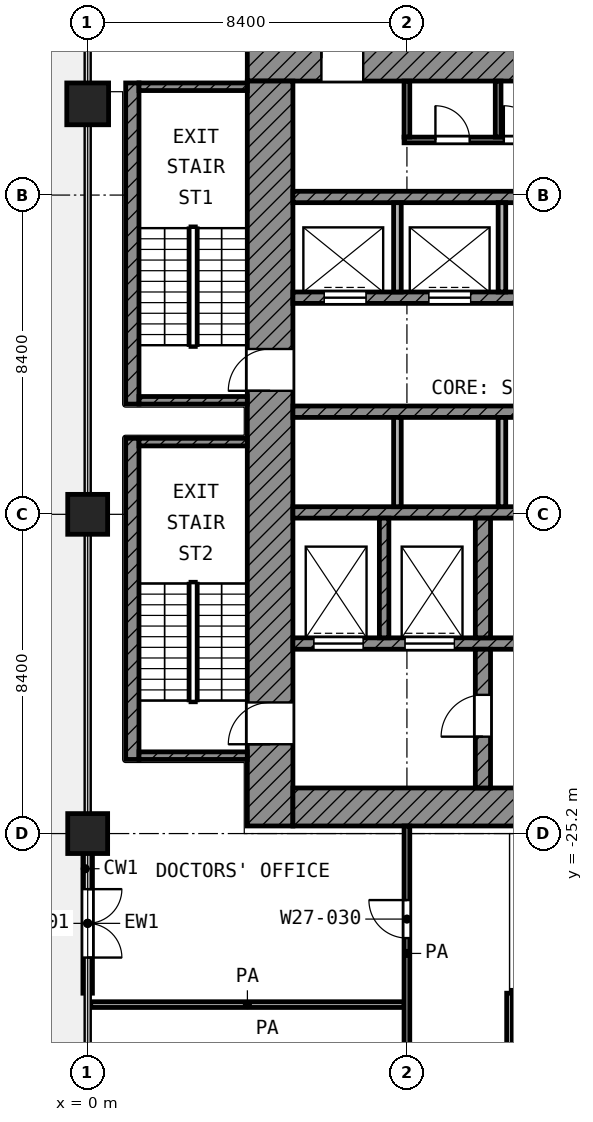
"""IFC4 building model, lengths in metres.
Left out: names, types, materials, properties, quantities, classifications, styles, units other than length and angle.
Written with IfcOpenShell. Run it as: python <this file> out.ifc"""

import sys

from ifc_helpers import new_model, si_unit, direction, frame, frame_2d, origin, origin_2d, place, context, subcontext, project, spatial, rectangle, extrude, element, fill, save


model = new_model("IFC4")
c1 = context("Model", 3, precision=1e-05, world=origin(), true_north=direction((0.0, 1.0)))
c2 = subcontext(c1, "Body", "Model", "MODEL_VIEW")
j1 = project(units=[si_unit("LENGTHUNIT", "METRE"), si_unit("PLANEANGLEUNIT", "RADIAN")], contexts=[c1])
p1 = place(None, origin())
s1 = spatial("IfcSite", under=j1, at=p1, CompositionType="ELEMENT")
p2 = place(p1, origin())
s2 = spatial("IfcBuilding", under=s1, at=p2, CompositionType="ELEMENT")
p3 = place(p2, frame((0.0, 0.0, 119.8)))
s3 = spatial("IfcBuildingStorey", under=s2, at=p3, CompositionType="ELEMENT", Elevation=119.8)
p4 = place(p3, frame((0.0, -6.0, 0.0), z_axis=(0.0, 0.0, 1.0), x_axis=(1.0, 0.0, 0.0)))
e1 = element("IfcColumn", 1, at=p4, inside=s3, PredefinedType="COLUMN", context=c2, shape_type="SweptSolid", body=[
    extrude(rectangle(XDim=1.1, YDim=1.1, at=origin_2d()), origin(), (0.0, 0.0, 1.0), 4.2),
])
for number, where, z_axis, x_axis in (
    (2, (0.0, -16.8, 0.0), (0.0, 0.0, 1.0), (1.0, 0.0, 0.0)),
    (3, (0.0, -25.2, 0.0), (0.0, 0.0, 1.0), (1.0, 0.0, 0.0)),
):
    element("IfcColumn", number, at=place(p3, frame(where, z_axis=z_axis, x_axis=x_axis)), inside=s3, PredefinedType="COLUMN", context=c2, shape_type="SweptSolid", body=[
        extrude(rectangle(XDim=1.05, YDim=1.05, at=origin_2d()), origin(), (0.0, 0.0, 1.0), 4.2),
    ])
p5 = place(p3, frame((0.0, -25.725, 0.0), z_axis=(0.0, 0.0, 1.0), x_axis=(0.0, -1.0, 0.0)))
e4 = element("IfcWall", 4, at=p5, inside=s3, PredefinedType="SOLIDWALL", context=c2, shape_type="SweptSolid", body=[
    extrude(rectangle(XDim=3.675, YDim=0.25, at=frame_2d((1.837, 0.0))), origin(), (0.0, 0.0, 1.0), 3.48),
])
p6 = place(p5, frame((0.938, 0.0, 0.0)))
e5 = element("IfcOpeningElement", 5, at=p6, cuts=e4, PredefinedType="OPENING", context=c2, shape_type="SweptSolid", body=[
    extrude(rectangle(XDim=1.8, YDim=2.1, at=frame_2d((0.9, 1.05))), frame((0.0, 0.135, 0.0), z_axis=(0.0, -1.0, 0.0), x_axis=(1.0, 0.0, 0.0)), (0.0, 0.0, 1.0), 0.27),
])
p7 = place(p3, frame((4.2, -4.8, 0.0), z_axis=(0.0, 0.0, 1.0), x_axis=(1.0, 0.0, 0.0)))
e6 = element("IfcWall", 6, at=p7, inside=s3, PredefinedType="SHEAR", context=c2, shape_type="SweptSolid", body=[
    extrude(rectangle(XDim=20.8, YDim=1.2, at=frame_2d((10.4, 0.0))), origin(), (0.0, 0.0, 1.0), 3.6),
])
p8 = place(p7, frame((1.95, 0.0, 0.0)))
e7 = element("IfcOpeningElement", 7, at=p8, cuts=e6, PredefinedType="OPENING", context=c2, shape_type="SweptSolid", body=[
    extrude(rectangle(XDim=1.1, YDim=2.1, at=frame_2d((0.55, 1.05))), frame((0.0, 0.61, 0.0), z_axis=(0.0, -1.0, 0.0), x_axis=(1.0, 0.0, 0.0)), (0.0, 0.0, 1.0), 1.22),
])
p9 = place(p7, frame((17.95, 0.0, 0.0)))
e8 = element("IfcOpeningElement", 8, at=p9, cuts=e6, PredefinedType="OPENING", context=c2, shape_type="SweptSolid", body=[
    extrude(rectangle(XDim=1.1, YDim=2.1, at=frame_2d((0.55, 1.05))), frame((0.0, 0.61, 0.0), z_axis=(0.0, -1.0, 0.0), x_axis=(1.0, 0.0, 0.0)), (0.0, 0.0, 1.0), 1.22),
])
p10 = place(p3, frame((4.8, -25.0, 0.0), z_axis=(0.0, 0.0, 1.0), x_axis=(0.0, 1.0, 0.0)))
e9 = element("IfcWall", 9, at=p10, inside=s3, PredefinedType="SHEAR", context=c2, shape_type="SweptSolid", body=[
    extrude(rectangle(XDim=19.6, YDim=1.2, at=frame_2d((9.8, 0.0))), origin(), (0.0, 0.0, 1.0), 3.6),
])
p11 = place(p10, frame((11.45, 0.0, 0.0)))
e10 = element("IfcOpeningElement", 10, at=p11, cuts=e9, PredefinedType="OPENING", context=c2, shape_type="SweptSolid", body=[
    extrude(rectangle(XDim=1.1, YDim=2.1, at=frame_2d((0.55, 1.05))), frame((0.0, 0.61, 0.0), z_axis=(0.0, -1.0, 0.0), x_axis=(1.0, 0.0, 0.0)), (0.0, 0.0, 1.0), 1.22),
])
p12 = place(p10, frame((2.15, 0.0, 0.0)))
e11 = element("IfcOpeningElement", 11, at=p12, cuts=e9, PredefinedType="OPENING", context=c2, shape_type="SweptSolid", body=[
    extrude(rectangle(XDim=1.1, YDim=2.1, at=frame_2d((0.55, 1.05))), frame((0.0, 0.61, 0.0), z_axis=(0.0, -1.0, 0.0), x_axis=(1.0, 0.0, 0.0)), (0.0, 0.0, 1.0), 1.22),
])
p13 = place(p3, frame((5.4, -24.5, 0.0), z_axis=(0.0, 0.0, 1.0), x_axis=(1.0, 0.0, 0.0)))
e12 = element("IfcWall", 12, at=p13, inside=s3, PredefinedType="SHEAR", context=c2, shape_type="SweptSolid", body=[
    extrude(rectangle(XDim=18.6, YDim=1.0, at=frame_2d((9.3, 0.0))), origin(), (0.0, 0.0, 1.0), 3.6),
])
p14 = place(p13, frame((6.3, 0.0, 0.0)))
e13 = element("IfcOpeningElement", 13, at=p14, cuts=e12, PredefinedType="OPENING", context=c2, shape_type="SweptSolid", body=[
    extrude(rectangle(XDim=1.8, YDim=2.1, at=frame_2d((0.9, 1.05))), frame((0.0, 0.51, 0.0), z_axis=(0.0, -1.0, 0.0), x_axis=(1.0, 0.0, 0.0)), (0.0, 0.0, 1.0), 1.02),
])
p15 = place(p3, frame((5.4, -8.45, 0.0), z_axis=(0.0, 0.0, 1.0), x_axis=(1.0, 0.0, 0.0)))
e14 = element("IfcWall", 14, at=p15, inside=s3, PredefinedType="SHEAR", context=c2, shape_type="SweptSolid", body=[
    extrude(rectangle(XDim=16.65, YDim=0.3, at=frame_2d((8.325, 0.0))), origin(), (0.0, 0.0, 1.0), 3.6),
])
p16 = place(p3, frame((5.4, -11.1, 0.0), z_axis=(0.0, 0.0, 1.0), x_axis=(1.0, 0.0, 0.0)))
e15 = element("IfcWall", 15, at=p16, inside=s3, PredefinedType="SHEAR", context=c2, shape_type="SweptSolid", body=[
    extrude(rectangle(XDim=16.65, YDim=0.3, at=frame_2d((8.325, 0.0))), origin(), (0.0, 0.0, 1.0), 3.6),
])
p17 = place(p16, frame((0.825, 0.0, 0.0)))
e16 = element("IfcOpeningElement", 16, at=p17, cuts=e15, PredefinedType="OPENING", context=c2, shape_type="SweptSolid", body=[
    extrude(rectangle(XDim=1.1, YDim=2.1, at=frame_2d((0.55, 1.05))), frame((0.0, 0.16, 0.0), z_axis=(0.0, -1.0, 0.0), x_axis=(1.0, 0.0, 0.0)), (0.0, 0.0, 1.0), 0.32),
])
p18 = place(p16, frame((3.575, 0.0, 0.0)))
e17 = element("IfcOpeningElement", 17, at=p18, cuts=e15, PredefinedType="OPENING", context=c2, shape_type="SweptSolid", body=[
    extrude(rectangle(XDim=1.1, YDim=2.1, at=frame_2d((0.55, 1.05))), frame((0.0, 0.16, 0.0), z_axis=(0.0, -1.0, 0.0), x_axis=(1.0, 0.0, 0.0)), (0.0, 0.0, 1.0), 0.32),
])
p19 = place(p16, frame((6.325, 0.0, 0.0)))
e18 = element("IfcOpeningElement", 18, at=p19, cuts=e15, PredefinedType="OPENING", context=c2, shape_type="SweptSolid", body=[
    extrude(rectangle(XDim=1.1, YDim=2.1, at=frame_2d((0.55, 1.05))), frame((0.0, 0.16, 0.0), z_axis=(0.0, -1.0, 0.0), x_axis=(1.0, 0.0, 0.0)), (0.0, 0.0, 1.0), 0.32),
])
p20 = place(p16, frame((9.075, 0.0, 0.0)))
e19 = element("IfcOpeningElement", 19, at=p20, cuts=e15, PredefinedType="OPENING", context=c2, shape_type="SweptSolid", body=[
    extrude(rectangle(XDim=1.1, YDim=2.1, at=frame_2d((0.55, 1.05))), frame((0.0, 0.16, 0.0), z_axis=(0.0, -1.0, 0.0), x_axis=(1.0, 0.0, 0.0)), (0.0, 0.0, 1.0), 0.32),
])
for number, where, z_axis, x_axis in (
    (20, (5.4, -14.1, 0.0), (0.0, 0.0, 1.0), (1.0, 0.0, 0.0)),
    (21, (5.4, -16.75, 0.0), (0.0, 0.0, 1.0), (1.0, 0.0, 0.0)),
):
    element("IfcWall", number, at=place(p3, frame(where, z_axis=z_axis, x_axis=x_axis)), inside=s3, PredefinedType="SHEAR", context=c2, shape_type="SweptSolid", body=[
        extrude(rectangle(XDim=16.65, YDim=0.3, at=frame_2d((8.325, 0.0))), origin(), (0.0, 0.0, 1.0), 3.6),
    ])
p21 = place(p3, frame((5.4, -20.2, 0.0), z_axis=(0.0, 0.0, 1.0), x_axis=(1.0, 0.0, 0.0)))
e22 = element("IfcWall", 22, at=p21, inside=s3, PredefinedType="SHEAR", context=c2, shape_type="SweptSolid", body=[
    extrude(rectangle(XDim=14.65, YDim=0.3, at=frame_2d((7.325, 0.0))), origin(), (0.0, 0.0, 1.0), 3.6),
])
p22 = place(p21, frame((10.55, 0.0, 0.0)))
e23 = element("IfcOpeningElement", 23, at=p22, cuts=e22, PredefinedType="OPENING", context=c2, shape_type="SweptSolid", body=[
    extrude(rectangle(XDim=1.3, YDim=2.1, at=frame_2d((0.65, 1.05))), frame((0.0, 0.16, 0.0), z_axis=(0.0, -1.0, 0.0), x_axis=(1.0, 0.0, 0.0)), (0.0, 0.0, 1.0), 0.32),
])
p23 = place(p21, frame((12.95, 0.0, 0.0)))
e24 = element("IfcOpeningElement", 24, at=p23, cuts=e22, PredefinedType="OPENING", context=c2, shape_type="SweptSolid", body=[
    extrude(rectangle(XDim=1.3, YDim=2.1, at=frame_2d((0.65, 1.05))), frame((0.0, 0.16, 0.0), z_axis=(0.0, -1.0, 0.0), x_axis=(1.0, 0.0, 0.0)), (0.0, 0.0, 1.0), 0.32),
])
p24 = place(p21, frame((0.55, 0.0, 0.0)))
e25 = element("IfcOpeningElement", 25, at=p24, cuts=e22, PredefinedType="OPENING", context=c2, shape_type="SweptSolid", body=[
    extrude(rectangle(XDim=1.3, YDim=2.1, at=frame_2d((0.65, 1.05))), frame((0.0, 0.16, 0.0), z_axis=(0.0, -1.0, 0.0), x_axis=(1.0, 0.0, 0.0)), (0.0, 0.0, 1.0), 0.32),
])
p25 = place(p21, frame((2.95, 0.0, 0.0)))
e26 = element("IfcOpeningElement", 26, at=p25, cuts=e22, PredefinedType="OPENING", context=c2, shape_type="SweptSolid", body=[
    extrude(rectangle(XDim=1.3, YDim=2.1, at=frame_2d((0.65, 1.05))), frame((0.0, 0.16, 0.0), z_axis=(0.0, -1.0, 0.0), x_axis=(1.0, 0.0, 0.0)), (0.0, 0.0, 1.0), 0.32),
])
p26 = place(p21, frame((7.15, 0.0, 0.0)))
e27 = element("IfcOpeningElement", 27, at=p26, cuts=e22, PredefinedType="OPENING", context=c2, shape_type="SweptSolid", body=[
    extrude(rectangle(XDim=0.9, YDim=2.1, at=frame_2d((0.45, 1.05))), frame((0.0, 0.16, 0.0), z_axis=(0.0, -1.0, 0.0), x_axis=(1.0, 0.0, 0.0)), (0.0, 0.0, 1.0), 0.32),
])
p27 = place(p3, frame((10.4, -24.0, 0.0), z_axis=(0.0, 0.0, 1.0), x_axis=(0.0, 1.0, 0.0)))
e28 = element("IfcWall", 28, at=p27, inside=s3, PredefinedType="SHEAR", context=c2, shape_type="SweptSolid", body=[
    extrude(rectangle(XDim=3.65, YDim=0.4, at=frame_2d((1.825, 0.0))), origin(), (0.0, 0.0, 1.0), 3.6),
])
p28 = place(p27, frame((1.35, 0.0, 0.0)))
e29 = element("IfcOpeningElement", 29, at=p28, cuts=e28, PredefinedType="OPENING", context=c2, shape_type="SweptSolid", body=[
    extrude(rectangle(XDim=1.1, YDim=2.1, at=frame_2d((0.55, 1.05))), frame((0.0, 0.21, 0.0), z_axis=(0.0, -1.0, 0.0), x_axis=(1.0, 0.0, 0.0)), (0.0, 0.0, 1.0), 0.42),
])
p29 = place(p3, frame((10.4, -20.05, 0.0), z_axis=(0.0, 0.0, 1.0), x_axis=(0.0, 1.0, 0.0)))
e30 = element("IfcWall", 30, at=p29, inside=s3, PredefinedType="SHEAR", context=c2, shape_type="SweptSolid", body=[
    extrude(rectangle(XDim=3.15, YDim=0.4, at=frame_2d((1.575, 0.0))), origin(), (0.0, 0.0, 1.0), 3.6),
])
p30 = place(p3, frame((7.8, -20.05, 0.0), z_axis=(0.0, 0.0, 1.0), x_axis=(0.0, 1.0, 0.0)))
e31 = element("IfcWall", 31, at=p30, inside=s3, PredefinedType="SHEAR", context=c2, shape_type="SweptSolid", body=[
    extrude(rectangle(XDim=3.15, YDim=0.25, at=frame_2d((1.575, 0.0))), origin(), (0.0, 0.0, 1.0), 3.6),
])
for number, where, z_axis, x_axis in (
    (32, (8.15, -10.95, 0.0), (0.0, 0.0, 1.0), (0.0, 1.0, 0.0)),
    (33, (10.9, -10.95, 0.0), (0.0, 0.0, 1.0), (0.0, 1.0, 0.0)),
):
    element("IfcWall", number, at=place(p3, frame(where, z_axis=z_axis, x_axis=x_axis)), inside=s3, PredefinedType="PARTITIONING", context=c2, shape_type="SweptSolid", body=[
        extrude(rectangle(XDim=2.35, YDim=0.2, at=frame_2d((1.175, 0.0))), origin(), (0.0, 0.0, 1.0), 3.6),
    ])
for number, where, z_axis, x_axis in (
    (34, (8.15, -16.6, 0.0), (0.0, 0.0, 1.0), (0.0, 1.0, 0.0)),
    (35, (10.9, -16.6, 0.0), (0.0, 0.0, 1.0), (0.0, 1.0, 0.0)),
):
    element("IfcWall", number, at=place(p3, frame(where, z_axis=z_axis, x_axis=x_axis)), inside=s3, PredefinedType="PARTITIONING", context=c2, shape_type="SweptSolid", body=[
        extrude(rectangle(XDim=2.35, YDim=0.2, at=frame_2d((1.175, 0.0))), origin(), (0.0, 0.0, 1.0), 3.6),
    ])
p31 = place(p3, frame((8.325, -6.95, 0.0), z_axis=(0.0, 0.0, 1.0), x_axis=(1.0, 0.0, 0.0)))
e36 = element("IfcWall", 36, at=p31, inside=s3, PredefinedType="PARTITIONING", context=c2, shape_type="SweptSolid", body=[
    extrude(rectangle(XDim=6.45, YDim=0.15, at=frame_2d((3.225, 0.0))), origin(), (0.0, 0.0, 1.0), 3.6),
])
p32 = place(p31, frame((0.825, 0.0, 0.0)))
e37 = element("IfcOpeningElement", 37, at=p32, cuts=e36, PredefinedType="OPENING", context=c2, shape_type="SweptSolid", body=[
    extrude(rectangle(XDim=0.9, YDim=2.1, at=frame_2d((0.45, 1.05))), frame((0.0, 0.085, 0.0), z_axis=(0.0, -1.0, 0.0), x_axis=(1.0, 0.0, 0.0)), (0.0, 0.0, 1.0), 0.17),
])
p33 = place(p31, frame((2.625, 0.0, 0.0)))
e38 = element("IfcOpeningElement", 38, at=p33, cuts=e36, PredefinedType="OPENING", context=c2, shape_type="SweptSolid", body=[
    extrude(rectangle(XDim=0.9, YDim=2.1, at=frame_2d((0.45, 1.05))), frame((0.0, 0.085, 0.0), z_axis=(0.0, -1.0, 0.0), x_axis=(1.0, 0.0, 0.0)), (0.0, 0.0, 1.0), 0.17),
])
p34 = place(p31, frame((4.575, 0.0, 0.0)))
e39 = element("IfcOpeningElement", 39, at=p34, cuts=e36, PredefinedType="OPENING", context=c2, shape_type="SweptSolid", body=[
    extrude(rectangle(XDim=0.9, YDim=2.1, at=frame_2d((0.45, 1.05))), frame((0.0, 0.085, 0.0), z_axis=(0.0, -1.0, 0.0), x_axis=(1.0, 0.0, 0.0)), (0.0, 0.0, 1.0), 0.17),
])
for number, where, z_axis, x_axis in (
    (40, (8.4, -6.875, 0.0), (0.0, 0.0, 1.0), (0.0, 1.0, 0.0)),
    (41, (10.8, -6.875, 0.0), (0.0, 0.0, 1.0), (0.0, 1.0, 0.0)),
):
    element("IfcWall", number, at=place(p3, frame(where, z_axis=z_axis, x_axis=x_axis)), inside=s3, PredefinedType="PARTITIONING", context=c2, shape_type="SweptSolid", body=[
        extrude(rectangle(XDim=1.475, YDim=0.15, at=frame_2d((0.738, 0.0))), origin(), (0.0, 0.0, 1.0), 3.6),
    ])
p35 = place(p3, frame((1.175, -13.9, 0.0), z_axis=(0.0, 0.0, 1.0), x_axis=(0.0, 1.0, 0.0)))
e42 = element("IfcWall", 42, at=p35, inside=s3, PredefinedType="SHEAR", context=c2, shape_type="SweptSolid", body=[
    extrude(rectangle(XDim=8.45, YDim=0.35, at=frame_2d((4.225, 0.0))), origin(), (0.0, 0.0, 1.0), 3.6),
])
for number, where, z_axis, x_axis in (
    (43, (1.35, -5.55, 0.0), (0.0, 0.0, 1.0), (1.0, 0.0, 0.0)),
    (44, (1.35, -13.8, 0.0), (0.0, 0.0, 1.0), (1.0, 0.0, 0.0)),
):
    element("IfcWall", number, at=place(p3, frame(where, z_axis=z_axis, x_axis=x_axis)), inside=s3, PredefinedType="SHEAR", context=c2, shape_type="SweptSolid", body=[
        extrude(rectangle(XDim=2.85, YDim=0.2, at=frame_2d((1.425, 0.0))), origin(), (0.0, 0.0, 1.0), 3.6),
    ])
p36 = place(p3, frame((1.175, -23.25, 0.0), z_axis=(0.0, 0.0, 1.0), x_axis=(0.0, 1.0, 0.0)))
e45 = element("IfcWall", 45, at=p36, inside=s3, PredefinedType="SHEAR", context=c2, shape_type="SweptSolid", body=[
    extrude(rectangle(XDim=8.45, YDim=0.35, at=frame_2d((4.225, 0.0))), origin(), (0.0, 0.0, 1.0), 3.6),
])
for number, where, z_axis, x_axis in (
    (46, (1.35, -14.9, 0.0), (0.0, 0.0, 1.0), (1.0, 0.0, 0.0)),
    (47, (1.35, -23.15, 0.0), (0.0, 0.0, 1.0), (1.0, 0.0, 0.0)),
):
    element("IfcWall", number, at=place(p3, frame(where, z_axis=z_axis, x_axis=x_axis)), inside=s3, PredefinedType="SHEAR", context=c2, shape_type="SweptSolid", body=[
        extrude(rectangle(XDim=2.85, YDim=0.2, at=frame_2d((1.425, 0.0))), origin(), (0.0, 0.0, 1.0), 3.6),
    ])
p37 = place(p3, frame((0.08, -29.7, 0.0), z_axis=(0.0, 0.0, 1.0), x_axis=(1.0, 0.0, 0.0)))
e48 = element("IfcWall", 48, at=p37, inside=s3, PredefinedType="PARTITIONING", context=c2, shape_type="SweptSolid", body=[
    extrude(rectangle(XDim=8.245, YDim=0.15, at=frame_2d((4.123, 0.0))), origin(), (0.0, 0.0, 1.0), 3.6),
])
p38 = place(p3, frame((11.175, -29.4, 0.0), z_axis=(0.0, 0.0, 1.0), x_axis=(1.0, 0.0, 0.0)))
e49 = element("IfcWall", 49, at=p38, inside=s3, PredefinedType="PARTITIONING", context=c2, shape_type="SweptSolid", body=[
    extrude(rectangle(XDim=2.85, YDim=0.15, at=frame_2d((1.425, 0.0))), origin(), (0.0, 0.0, 1.0), 3.6),
])
p39 = place(p3, frame((8.4, -31.707, 0.0), z_axis=(0.0, 0.0, 1.0), x_axis=(0.0, 1.0, 0.0)))
e50 = element("IfcWall", 50, at=p39, inside=s3, PredefinedType="PARTITIONING", context=c2, shape_type="SweptSolid", body=[
    extrude(rectangle(XDim=6.707, YDim=0.15, at=frame_2d((3.354, 0.0))), origin(), (0.0, 0.0, 1.0), 3.6),
])
p40 = place(p39, frame((3.757, 0.0, 0.0)))
e51 = element("IfcOpeningElement", 51, at=p40, cuts=e50, PredefinedType="OPENING", context=c2, shape_type="SweptSolid", body=[
    extrude(rectangle(XDim=1.0, YDim=2.1, at=frame_2d((0.5, 1.05))), frame((0.0, 0.085, 0.0), z_axis=(0.0, -1.0, 0.0), x_axis=(1.0, 0.0, 0.0)), (0.0, 0.0, 1.0), 0.17),
])
p41 = place(p3, frame((11.1, -56.1, 0.0), z_axis=(0.0, 0.0, 1.0), x_axis=(0.0, 1.0, 0.0)))
e52 = element("IfcWall", 52, at=p41, inside=s3, PredefinedType="PARTITIONING", context=c2, shape_type="SweptSolid", body=[
    extrude(rectangle(XDim=26.7, YDim=0.15, at=frame_2d((13.35, 0.0))), origin(), (0.0, 0.0, 1.0), 3.6),
])
p42 = place(p6, origin())
e53 = element("IfcDoor", 53, at=p42, inside=s3, OperationType="DOUBLE_DOOR_SINGLE_SWING", PredefinedType="DOOR", context=c2, shape_type="SweptSolid", body=[
    extrude(rectangle(XDim=1.8, YDim=2.1, at=frame_2d((0.9, 1.05))), frame((0.0, 0.025, 0.0), z_axis=(0.0, -1.0, 0.0), x_axis=(1.0, 0.0, 0.0)), (0.0, 0.0, 1.0), 0.05),
])
fill(e5, e53)
p43 = place(p17, origin())
e54 = element("IfcDoor", 54, at=p43, inside=s3, OperationType="DOUBLE_DOOR_SLIDING", PredefinedType="DOOR", context=c2, shape_type="SweptSolid", body=[
    extrude(rectangle(XDim=1.1, YDim=2.1, at=frame_2d((0.55, 1.05))), frame((0.0, 0.025, 0.0), z_axis=(0.0, -1.0, 0.0), x_axis=(1.0, 0.0, 0.0)), (0.0, 0.0, 1.0), 0.05),
])
fill(e16, e54)
p44 = place(p18, origin())
e55 = element("IfcDoor", 55, at=p44, inside=s3, OperationType="DOUBLE_DOOR_SLIDING", PredefinedType="DOOR", context=c2, shape_type="SweptSolid", body=[
    extrude(rectangle(XDim=1.1, YDim=2.1, at=frame_2d((0.55, 1.05))), frame((0.0, 0.025, 0.0), z_axis=(0.0, -1.0, 0.0), x_axis=(1.0, 0.0, 0.0)), (0.0, 0.0, 1.0), 0.05),
])
fill(e17, e55)
p45 = place(p24, origin())
e56 = element("IfcDoor", 56, at=p45, inside=s3, OperationType="DOUBLE_DOOR_SLIDING", PredefinedType="DOOR", context=c2, shape_type="SweptSolid", body=[
    extrude(rectangle(XDim=1.3, YDim=2.1, at=frame_2d((0.65, 1.05))), frame((0.0, 0.025, 0.0), z_axis=(0.0, -1.0, 0.0), x_axis=(1.0, 0.0, 0.0)), (0.0, 0.0, 1.0), 0.05),
])
fill(e25, e56)
p46 = place(p25, origin())
e57 = element("IfcDoor", 57, at=p46, inside=s3, OperationType="DOUBLE_DOOR_SLIDING", PredefinedType="DOOR", context=c2, shape_type="SweptSolid", body=[
    extrude(rectangle(XDim=1.3, YDim=2.1, at=frame_2d((0.65, 1.05))), frame((0.0, 0.025, 0.0), z_axis=(0.0, -1.0, 0.0), x_axis=(1.0, 0.0, 0.0)), (0.0, 0.0, 1.0), 0.05),
])
fill(e26, e57)
p47 = place(p11, origin())
e58 = element("IfcDoor", 58, at=p47, inside=s3, OperationType="SINGLE_SWING_LEFT", PredefinedType="DOOR", context=c2, shape_type="SweptSolid", body=[
    extrude(rectangle(XDim=1.1, YDim=2.1, at=frame_2d((0.55, 1.05))), frame((0.0, 0.025, 0.0), z_axis=(0.0, -1.0, 0.0), x_axis=(1.0, 0.0, 0.0)), (0.0, 0.0, 1.0), 0.05),
])
fill(e10, e58)
p48 = place(p12, origin())
e59 = element("IfcDoor", 59, at=p48, inside=s3, OperationType="SINGLE_SWING_LEFT", PredefinedType="DOOR", context=c2, shape_type="SweptSolid", body=[
    extrude(rectangle(XDim=1.1, YDim=2.1, at=frame_2d((0.55, 1.05))), frame((0.0, 0.025, 0.0), z_axis=(0.0, -1.0, 0.0), x_axis=(1.0, 0.0, 0.0)), (0.0, 0.0, 1.0), 0.05),
])
fill(e11, e59)
p49 = place(p8, origin())
e60 = element("IfcDoor", 60, at=p49, inside=s3, OperationType="SINGLE_SWING_LEFT", PredefinedType="DOOR", context=c2, shape_type="SweptSolid", body=[
    extrude(rectangle(XDim=1.1, YDim=2.1, at=frame_2d((0.55, 1.05))), frame((0.0, 0.025, 0.0), z_axis=(0.0, -1.0, 0.0), x_axis=(1.0, 0.0, 0.0)), (0.0, 0.0, 1.0), 0.05),
])
fill(e7, e60)
p50 = place(p28, origin())
e61 = element("IfcDoor", 61, at=p50, inside=s3, OperationType="SINGLE_SWING_LEFT", PredefinedType="DOOR", context=c2, shape_type="SweptSolid", body=[
    extrude(rectangle(XDim=1.1, YDim=2.1, at=frame_2d((0.55, 1.05))), frame((0.0, 0.025, 0.0), z_axis=(0.0, -1.0, 0.0), x_axis=(1.0, 0.0, 0.0)), (0.0, 0.0, 1.0), 0.05),
])
fill(e29, e61)
p51 = place(p32, origin())
e62 = element("IfcDoor", 62, at=p51, inside=s3, OperationType="SINGLE_SWING_LEFT", PredefinedType="DOOR", context=c2, shape_type="SweptSolid", body=[
    extrude(rectangle(XDim=0.9, YDim=2.1, at=frame_2d((0.45, 1.05))), frame((0.0, 0.025, 0.0), z_axis=(0.0, -1.0, 0.0), x_axis=(1.0, 0.0, 0.0)), (0.0, 0.0, 1.0), 0.05),
])
fill(e37, e62)
p52 = place(p33, origin())
e63 = element("IfcDoor", 63, at=p52, inside=s3, OperationType="SINGLE_SWING_LEFT", PredefinedType="DOOR", context=c2, shape_type="SweptSolid", body=[
    extrude(rectangle(XDim=0.9, YDim=2.1, at=frame_2d((0.45, 1.05))), frame((0.0, 0.025, 0.0), z_axis=(0.0, -1.0, 0.0), x_axis=(1.0, 0.0, 0.0)), (0.0, 0.0, 1.0), 0.05),
])
fill(e38, e63)
p53 = place(p40, origin())
e64 = element("IfcDoor", 64, at=p53, inside=s3, OperationType="SINGLE_SWING_RIGHT", PredefinedType="DOOR", context=c2, shape_type="SweptSolid", body=[
    extrude(rectangle(XDim=1.0, YDim=2.1, at=frame_2d((0.5, 1.05))), frame((0.0, 0.025, 0.0), z_axis=(0.0, -1.0, 0.0), x_axis=(1.0, 0.0, 0.0)), (0.0, 0.0, 1.0), 0.05),
])
fill(e51, e64)
save(model, sys.argv[1])
